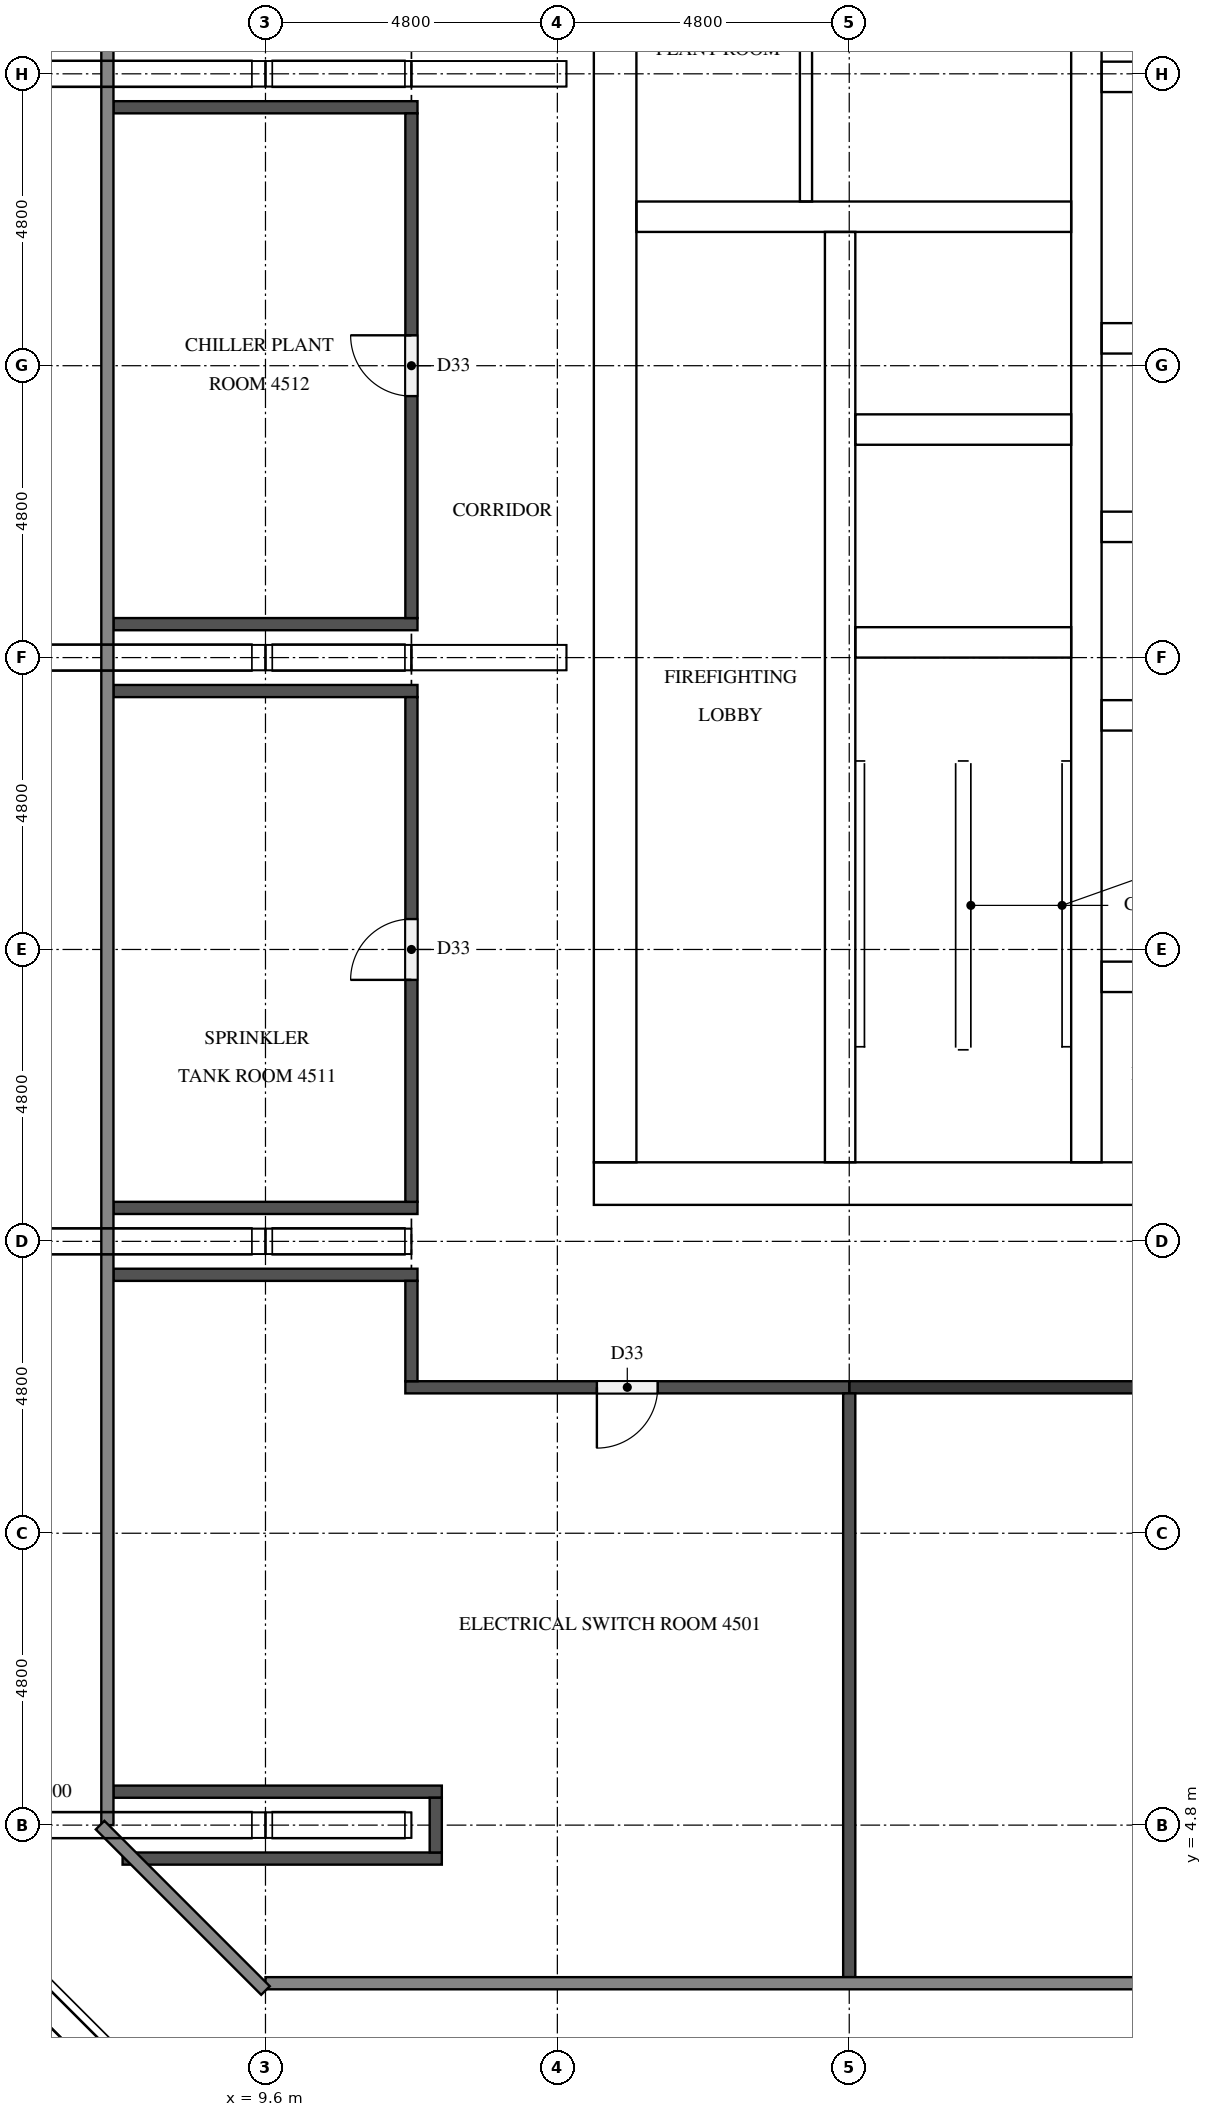
"""IFC4 building model, lengths in metres.
Left out: names, types, materials, properties, quantities, classifications, styles, units other than length and angle.
Written with IfcOpenShell. Run it as: python <this file> out.ifc"""

import sys

from ifc_helpers import new_model, si_unit, direction, frame, frame_2d, origin, place, context, subcontext, project, spatial, rectangle, extrude, element, fill, save


model = new_model("IFC4")
c1 = context("Model", 3, precision=1e-05, world=origin(), true_north=direction((0.0, 1.0)))
c2 = subcontext(c1, "Body", "Model", "MODEL_VIEW")
j1 = project(units=[si_unit("LENGTHUNIT", "METRE"), si_unit("PLANEANGLEUNIT", "RADIAN")], contexts=[c1])
p1 = place(None, origin())
s1 = spatial("IfcSite", under=j1, at=p1, CompositionType="ELEMENT")
p2 = place(p1, origin())
s2 = spatial("IfcBuilding", under=s1, at=p2, CompositionType="ELEMENT")
p3 = place(p2, frame((0.0, 0.0, 173.5)))
s3 = spatial("IfcBuildingStorey", under=s2, at=p3, CompositionType="ELEMENT", Elevation=173.5)
p4 = place(p3, frame((15.0, 15.35, 0.0), z_axis=(0.0, 0.0, 1.0), x_axis=(1.0, 0.0, 0.0)))
e1 = element("IfcWall", 1, at=p4, inside=s3, PredefinedType="SHEAR", context=c2, shape_type="SweptSolid", body=[
    extrude(rectangle(XDim=32.4, YDim=0.7, at=frame_2d((16.2, 0.0))), origin(), (0.0, 0.0, 1.0), 5.1),
])
p5 = place(p4, frame((15.3, 0.0, 0.0)))
e2 = element("IfcOpeningElement", 2, at=p5, cuts=e1, PredefinedType="OPENING", context=c2, shape_type="SweptSolid", body=[
    extrude(rectangle(XDim=1.8, YDim=2.1, at=frame_2d((0.9, 1.05))), frame((0.0, 0.36, 0.0), z_axis=(0.0, -1.0, 0.0), x_axis=(1.0, 0.0, 0.0)), (0.0, 0.0, 1.0), 0.72),
])
p6 = place(p3, frame((15.35, 15.7, 0.0), z_axis=(0.0, 0.0, 1.0), x_axis=(0.0, 1.0, 0.0)))
e3 = element("IfcWall", 3, at=p6, inside=s3, PredefinedType="SHEAR", context=c2, shape_type="SweptSolid", body=[
    extrude(rectangle(XDim=21.4, YDim=0.7, at=frame_2d((10.7, 0.0))), origin(), (0.0, 0.0, 1.0), 5.1),
])
p7 = place(p6, frame((5.06, 0.0, 0.0)))
e4 = element("IfcOpeningElement", 4, at=p7, cuts=e3, PredefinedType="OPENING", context=c2, shape_type="SweptSolid", body=[
    extrude(rectangle(XDim=1.2, YDim=2.1, at=frame_2d((0.6, 1.05))), frame((0.0, 0.36, 0.0), z_axis=(0.0, -1.0, 0.0), x_axis=(1.0, 0.0, 0.0)), (0.0, 0.0, 1.0), 0.72),
])
p8 = place(p3, frame((19.05, 15.7, 0.0), z_axis=(0.0, 0.0, 1.0), x_axis=(0.0, 1.0, 0.0)))
e5 = element("IfcWall", 5, at=p8, inside=s3, PredefinedType="SHEAR", context=c2, shape_type="SweptSolid", body=[
    extrude(rectangle(XDim=15.3, YDim=0.5, at=frame_2d((7.65, 0.0))), origin(), (0.0, 0.0, 1.0), 5.1),
])
p9 = place(p8, frame((9.75, 0.0, 0.0)))
e6 = element("IfcOpeningElement", 6, at=p9, cuts=e5, PredefinedType="OPENING", context=c2, shape_type="SweptSolid", body=[
    extrude(rectangle(XDim=1.1, YDim=2.1, at=frame_2d((0.55, 1.05))), frame((0.0, 0.26, 0.0), z_axis=(0.0, -1.0, 0.0), x_axis=(1.0, 0.0, 0.0)), (0.0, 0.0, 1.0), 0.52),
])
p10 = place(p8, frame((13.25, 0.0, 0.0)))
e7 = element("IfcOpeningElement", 7, at=p10, cuts=e5, PredefinedType="OPENING", context=c2, shape_type="SweptSolid", body=[
    extrude(rectangle(XDim=1.1, YDim=2.1, at=frame_2d((0.55, 1.05))), frame((0.0, 0.26, 0.0), z_axis=(0.0, -1.0, 0.0), x_axis=(1.0, 0.0, 0.0)), (0.0, 0.0, 1.0), 0.52),
])
p11 = place(p8, frame((0.5, 0.0, 0.0)))
e8 = element("IfcOpeningElement", 8, at=p11, cuts=e5, PredefinedType="OPENING", context=c2, shape_type="SweptSolid", body=[
    extrude(rectangle(XDim=1.2, YDim=2.1, at=frame_2d((0.6, 1.05))), frame((0.0, 0.26, 0.0), z_axis=(0.0, -1.0, 0.0), x_axis=(1.0, 0.0, 0.0)), (0.0, 0.0, 1.0), 0.52),
])
p12 = place(p3, frame((23.1, 15.7, 0.0), z_axis=(0.0, 0.0, 1.0), x_axis=(0.0, 1.0, 0.0)))
e9 = element("IfcWall", 9, at=p12, inside=s3, PredefinedType="SHEAR", context=c2, shape_type="SweptSolid", body=[
    extrude(rectangle(XDim=21.4, YDim=0.5, at=frame_2d((10.7, 0.0))), origin(), (0.0, 0.0, 1.0), 5.1),
])
for number, where, z_axis, x_axis in (
    (10, (19.3, 24.25, 0.0), (0.0, 0.0, 1.0), (1.0, 0.0, 0.0)),
    (11, (19.3, 27.75, 0.0), (0.0, 0.0, 1.0), (1.0, 0.0, 0.0)),
):
    element("IfcWall", number, at=place(p3, frame(where, z_axis=z_axis, x_axis=x_axis)), inside=s3, PredefinedType="SHEAR", context=c2, shape_type="SweptSolid", body=[
        extrude(rectangle(XDim=3.55, YDim=0.5, at=frame_2d((1.775, 0.0))), origin(), (0.0, 0.0, 1.0), 5.1),
    ])
p13 = place(p3, frame((15.7, 31.25, 0.0), z_axis=(0.0, 0.0, 1.0), x_axis=(1.0, 0.0, 0.0)))
e12 = element("IfcWall", 12, at=p13, inside=s3, PredefinedType="SHEAR", context=c2, shape_type="SweptSolid", body=[
    extrude(rectangle(XDim=7.15, YDim=0.5, at=frame_2d((3.575, 0.0))), origin(), (0.0, 0.0, 1.0), 5.1),
])
p14 = place(p3, frame((23.35, 18.75, 0.0), z_axis=(0.0, 0.0, 1.0), x_axis=(1.0, 0.0, 0.0)))
e13 = element("IfcWall", 13, at=p14, inside=s3, PredefinedType="SHEAR", context=c2, shape_type="SweptSolid", body=[
    extrude(rectangle(XDim=5.6, YDim=0.5, at=frame_2d((2.8, 0.0))), origin(), (0.0, 0.0, 1.0), 5.1),
])
p15 = place(p14, frame((2.05, 0.0, 0.0)))
e14 = element("IfcOpeningElement", 14, at=p15, cuts=e13, PredefinedType="OPENING", context=c2, shape_type="SweptSolid", body=[
    extrude(rectangle(XDim=1.0, YDim=2.1, at=frame_2d((0.5, 1.05))), frame((0.0, 0.26, 0.0), z_axis=(0.0, -1.0, 0.0), x_axis=(1.0, 0.0, 0.0)), (0.0, 0.0, 1.0), 0.52),
])
p16 = place(p3, frame((23.35, 23.05, 0.0), z_axis=(0.0, 0.0, 1.0), x_axis=(1.0, 0.0, 0.0)))
e15 = element("IfcWall", 15, at=p16, inside=s3, PredefinedType="SHEAR", context=c2, shape_type="SweptSolid", body=[
    extrude(rectangle(XDim=15.7, YDim=0.5, at=frame_2d((7.85, 0.0))), origin(), (0.0, 0.0, 1.0), 5.1),
])
p17 = place(p16, frame((2.05, 0.0, 0.0)))
e16 = element("IfcOpeningElement", 16, at=p17, cuts=e15, PredefinedType="OPENING", context=c2, shape_type="SweptSolid", body=[
    extrude(rectangle(XDim=1.0, YDim=2.1, at=frame_2d((0.5, 1.05))), frame((0.0, 0.26, 0.0), z_axis=(0.0, -1.0, 0.0), x_axis=(1.0, 0.0, 0.0)), (0.0, 0.0, 1.0), 0.52),
])
p18 = place(p16, frame((12.65, 0.0, 0.0)))
e17 = element("IfcOpeningElement", 17, at=p18, cuts=e15, PredefinedType="OPENING", context=c2, shape_type="SweptSolid", body=[
    extrude(rectangle(XDim=1.0, YDim=2.1, at=frame_2d((0.5, 1.05))), frame((0.0, 0.26, 0.0), z_axis=(0.0, -1.0, 0.0), x_axis=(1.0, 0.0, 0.0)), (0.0, 0.0, 1.0), 0.52),
])
p19 = place(p3, frame((23.35, 26.15, 0.0), z_axis=(0.0, 0.0, 1.0), x_axis=(1.0, 0.0, 0.0)))
e18 = element("IfcWall", 18, at=p19, inside=s3, PredefinedType="SHEAR", context=c2, shape_type="SweptSolid", body=[
    extrude(rectangle(XDim=15.7, YDim=0.5, at=frame_2d((7.85, 0.0))), origin(), (0.0, 0.0, 1.0), 5.1),
])
p20 = place(p3, frame((23.35, 29.25, 0.0), z_axis=(0.0, 0.0, 1.0), x_axis=(1.0, 0.0, 0.0)))
e19 = element("IfcWall", 19, at=p20, inside=s3, PredefinedType="SHEAR", context=c2, shape_type="SweptSolid", body=[
    extrude(rectangle(XDim=15.7, YDim=0.5, at=frame_2d((7.85, 0.0))), origin(), (0.0, 0.0, 1.0), 5.1),
])
p21 = place(p20, frame((0.675, 0.0, 0.0)))
e20 = element("IfcOpeningElement", 20, at=p21, cuts=e19, PredefinedType="OPENING", context=c2, shape_type="SweptSolid", body=[
    extrude(rectangle(XDim=1.1, YDim=2.1, at=frame_2d((0.55, 1.05))), frame((0.0, 0.26, 0.0), z_axis=(0.0, -1.0, 0.0), x_axis=(1.0, 0.0, 0.0)), (0.0, 0.0, 1.0), 0.52),
])
p22 = place(p20, frame((3.325, 0.0, 0.0)))
e21 = element("IfcOpeningElement", 21, at=p22, cuts=e19, PredefinedType="OPENING", context=c2, shape_type="SweptSolid", body=[
    extrude(rectangle(XDim=1.1, YDim=2.1, at=frame_2d((0.55, 1.05))), frame((0.0, 0.26, 0.0), z_axis=(0.0, -1.0, 0.0), x_axis=(1.0, 0.0, 0.0)), (0.0, 0.0, 1.0), 0.52),
])
p23 = place(p20, frame((5.975, 0.0, 0.0)))
e22 = element("IfcOpeningElement", 22, at=p23, cuts=e19, PredefinedType="OPENING", context=c2, shape_type="SweptSolid", body=[
    extrude(rectangle(XDim=1.1, YDim=2.1, at=frame_2d((0.55, 1.05))), frame((0.0, 0.26, 0.0), z_axis=(0.0, -1.0, 0.0), x_axis=(1.0, 0.0, 0.0)), (0.0, 0.0, 1.0), 0.52),
])
p24 = place(p20, frame((8.625, 0.0, 0.0)))
e23 = element("IfcOpeningElement", 23, at=p24, cuts=e19, PredefinedType="OPENING", context=c2, shape_type="SweptSolid", body=[
    extrude(rectangle(XDim=1.1, YDim=2.1, at=frame_2d((0.55, 1.05))), frame((0.0, 0.26, 0.0), z_axis=(0.0, -1.0, 0.0), x_axis=(1.0, 0.0, 0.0)), (0.0, 0.0, 1.0), 0.52),
])
p25 = place(p20, frame((11.275, 0.0, 0.0)))
e24 = element("IfcOpeningElement", 24, at=p25, cuts=e19, PredefinedType="OPENING", context=c2, shape_type="SweptSolid", body=[
    extrude(rectangle(XDim=1.1, YDim=2.1, at=frame_2d((0.55, 1.05))), frame((0.0, 0.26, 0.0), z_axis=(0.0, -1.0, 0.0), x_axis=(1.0, 0.0, 0.0)), (0.0, 0.0, 1.0), 0.52),
])
p26 = place(p20, frame((13.925, 0.0, 0.0)))
e25 = element("IfcOpeningElement", 25, at=p26, cuts=e19, PredefinedType="OPENING", context=c2, shape_type="SweptSolid", body=[
    extrude(rectangle(XDim=1.1, YDim=2.1, at=frame_2d((0.55, 1.05))), frame((0.0, 0.26, 0.0), z_axis=(0.0, -1.0, 0.0), x_axis=(1.0, 0.0, 0.0)), (0.0, 0.0, 1.0), 0.52),
])
p27 = place(p3, frame((23.35, 33.55, 0.0), z_axis=(0.0, 0.0, 1.0), x_axis=(1.0, 0.0, 0.0)))
e26 = element("IfcWall", 26, at=p27, inside=s3, PredefinedType="SHEAR", context=c2, shape_type="SweptSolid", body=[
    extrude(rectangle(XDim=5.6, YDim=0.5, at=frame_2d((2.8, 0.0))), origin(), (0.0, 0.0, 1.0), 5.1),
])
p28 = place(p27, frame((2.05, 0.0, 0.0)))
e27 = element("IfcOpeningElement", 27, at=p28, cuts=e26, PredefinedType="OPENING", context=c2, shape_type="SweptSolid", body=[
    extrude(rectangle(XDim=1.0, YDim=2.1, at=frame_2d((0.5, 1.05))), frame((0.0, 0.26, 0.0), z_axis=(0.0, -1.0, 0.0), x_axis=(1.0, 0.0, 0.0)), (0.0, 0.0, 1.0), 0.52),
])
p29 = place(p3, frame((18.489, 31.5, 0.0), z_axis=(0.0, 0.0, 1.0), x_axis=(0.0, 1.0, 0.0)))
e28 = element("IfcWall", 28, at=p29, inside=s3, PredefinedType="PARTITIONING", context=c2, shape_type="SweptSolid", body=[
    extrude(rectangle(XDim=5.6, YDim=0.2, at=frame_2d((2.8, 0.0))), origin(), (0.0, 0.0, 1.0), 5.1),
])
p30 = place(p3, frame((7.25, 4.25, 0.0), z_axis=(0.0, 0.0, 1.0), x_axis=(1.0, 0.0, 0.0)))
e29 = element("IfcWall", 29, at=p30, inside=s3, PredefinedType="PARTITIONING", context=c2, shape_type="SweptSolid", body=[
    extrude(rectangle(XDim=5.25, YDim=0.2, at=frame_2d((2.625, 0.0))), origin(), (0.0, 0.0, 1.0), 5.1),
])
p31 = place(p3, frame((7.1, 5.35, 0.0), z_axis=(0.0, 0.0, 1.0), x_axis=(1.0, 0.0, 0.0)))
e30 = element("IfcWall", 30, at=p31, inside=s3, PredefinedType="PARTITIONING", context=c2, shape_type="SweptSolid", body=[
    extrude(rectangle(XDim=5.4, YDim=0.2, at=frame_2d((2.7, 0.0))), origin(), (0.0, 0.0, 1.0), 5.1),
])
p32 = place(p3, frame((19.2, 12.0, 0.0), z_axis=(0.0, 0.0, 1.0), x_axis=(1.0, 0.0, 0.0)))
e31 = element("IfcWall", 31, at=p32, inside=s3, PredefinedType="PARTITIONING", context=c2, shape_type="SweptSolid", body=[
    extrude(rectangle(XDim=31.3, YDim=0.2, at=frame_2d((15.65, 0.0))), origin(), (0.0, 0.0, 1.0), 5.1),
])
p33 = place(p32, frame((22.95, 0.0, 0.0)))
e32 = element("IfcOpeningElement", 32, at=p33, cuts=e31, PredefinedType="OPENING", context=c2, shape_type="SweptSolid", body=[
    extrude(rectangle(XDim=1.0, YDim=2.1, at=frame_2d((0.5, 1.05))), frame((0.0, 0.11, 0.0), z_axis=(0.0, -1.0, 0.0), x_axis=(1.0, 0.0, 0.0)), (0.0, 0.0, 1.0), 0.22),
])
p34 = place(p32, frame((7.35, 0.0, 0.0)))
e33 = element("IfcOpeningElement", 33, at=p34, cuts=e31, PredefinedType="OPENING", context=c2, shape_type="SweptSolid", body=[
    extrude(rectangle(XDim=1.0, YDim=2.1, at=frame_2d((0.5, 1.05))), frame((0.0, 0.11, 0.0), z_axis=(0.0, -1.0, 0.0), x_axis=(1.0, 0.0, 0.0)), (0.0, 0.0, 1.0), 0.22),
])
p35 = place(p3, frame((19.2, 12.0, 0.0), z_axis=(0.0, 0.0, 1.0), x_axis=(-1.0, 0.0, 0.0)))
e34 = element("IfcWall", 34, at=p35, inside=s3, PredefinedType="PARTITIONING", context=c2, shape_type="SweptSolid", body=[
    extrude(rectangle(XDim=7.3, YDim=0.2, at=frame_2d((3.65, 0.0))), origin(), (0.0, 0.0, 1.0), 5.1),
])
p36 = place(p35, frame((3.15, 0.0, 0.0)))
e35 = element("IfcOpeningElement", 35, at=p36, cuts=e34, PredefinedType="OPENING", context=c2, shape_type="SweptSolid", body=[
    extrude(rectangle(XDim=1.0, YDim=2.1, at=frame_2d((0.5, 1.05))), frame((0.0, 0.11, 0.0), z_axis=(0.0, -1.0, 0.0), x_axis=(1.0, 0.0, 0.0)), (0.0, 0.0, 1.0), 0.22),
])
for number, where, z_axis, x_axis in (
    (36, (7.1, 13.85, 0.0), (0.0, 0.0, 1.0), (1.0, 0.0, 0.0)),
    (37, (7.1, 14.95, 0.0), (0.0, 0.0, 1.0), (1.0, 0.0, 0.0)),
    (38, (7.1, 23.45, 0.0), (0.0, 0.0, 1.0), (1.0, 0.0, 0.0)),
    (39, (7.1, 24.55, 0.0), (0.0, 0.0, 1.0), (1.0, 0.0, 0.0)),
    (40, (7.1, 33.05, 0.0), (0.0, 0.0, 1.0), (1.0, 0.0, 0.0)),
):
    element("IfcWall", number, at=place(p3, frame(where, z_axis=z_axis, x_axis=x_axis)), inside=s3, PredefinedType="PARTITIONING", context=c2, shape_type="SweptSolid", body=[
        extrude(rectangle(XDim=5.0, YDim=0.2, at=frame_2d((2.5, 0.0))), origin(), (0.0, 0.0, 1.0), 5.1),
    ])
p37 = place(p3, frame((12.0, 12.1, 0.0), z_axis=(0.0, 0.0, 1.0), x_axis=(0.0, 1.0, 0.0)))
e41 = element("IfcWall", 41, at=p37, inside=s3, PredefinedType="PARTITIONING", context=c2, shape_type="SweptSolid", body=[
    extrude(rectangle(XDim=1.65, YDim=0.2, at=frame_2d((0.825, 0.0))), origin(), (0.0, 0.0, 1.0), 5.1),
])
p38 = place(p3, frame((12.0, 15.05, 0.0), z_axis=(0.0, 0.0, 1.0), x_axis=(0.0, 1.0, 0.0)))
e42 = element("IfcWall", 42, at=p38, inside=s3, PredefinedType="PARTITIONING", context=c2, shape_type="SweptSolid", body=[
    extrude(rectangle(XDim=8.3, YDim=0.2, at=frame_2d((4.15, 0.0))), origin(), (0.0, 0.0, 1.0), 5.1),
])
p39 = place(p38, frame((3.65, 0.0, 0.0)))
e43 = element("IfcOpeningElement", 43, at=p39, cuts=e42, PredefinedType="OPENING", context=c2, shape_type="SweptSolid", body=[
    extrude(rectangle(XDim=1.0, YDim=2.1, at=frame_2d((0.5, 1.05))), frame((0.0, 0.11, 0.0), z_axis=(0.0, -1.0, 0.0), x_axis=(1.0, 0.0, 0.0)), (0.0, 0.0, 1.0), 0.22),
])
p40 = place(p3, frame((12.0, 24.65, 0.0), z_axis=(0.0, 0.0, 1.0), x_axis=(0.0, 1.0, 0.0)))
e44 = element("IfcWall", 44, at=p40, inside=s3, PredefinedType="PARTITIONING", context=c2, shape_type="SweptSolid", body=[
    extrude(rectangle(XDim=8.3, YDim=0.2, at=frame_2d((4.15, 0.0))), origin(), (0.0, 0.0, 1.0), 5.1),
])
p41 = place(p40, frame((3.65, 0.0, 0.0)))
e45 = element("IfcOpeningElement", 45, at=p41, cuts=e44, PredefinedType="OPENING", context=c2, shape_type="SweptSolid", body=[
    extrude(rectangle(XDim=1.0, YDim=2.1, at=frame_2d((0.5, 1.05))), frame((0.0, 0.11, 0.0), z_axis=(0.0, -1.0, 0.0), x_axis=(1.0, 0.0, 0.0)), (0.0, 0.0, 1.0), 0.22),
])
p42 = place(p3, frame((12.4, 4.35, 0.0), z_axis=(0.0, 0.0, 1.0), x_axis=(0.0, 1.0, 0.0)))
e46 = element("IfcWall", 46, at=p42, inside=s3, PredefinedType="PARTITIONING", context=c2, shape_type="SweptSolid", body=[
    extrude(rectangle(XDim=0.9, YDim=0.2, at=frame_2d((0.45, 0.0))), origin(), (0.0, 0.0, 1.0), 5.1),
])
p43 = place(p3, frame((19.2, 2.3, 0.0), z_axis=(0.0, 0.0, 1.0), x_axis=(0.0, 1.0, 0.0)))
e47 = element("IfcWall", 47, at=p43, inside=s3, PredefinedType="PARTITIONING", context=c2, shape_type="SweptSolid", body=[
    extrude(rectangle(XDim=9.6, YDim=0.2, at=frame_2d((4.8, 0.0))), origin(), (0.0, 0.0, 1.0), 5.1),
])
p44 = place(p9, origin())
e48 = element("IfcDoor", 48, at=p44, inside=s3, OperationType="DOUBLE_DOOR_SLIDING", PredefinedType="DOOR", context=c2, shape_type="SweptSolid", body=[
    extrude(rectangle(XDim=1.1, YDim=2.1, at=frame_2d((0.55, 1.05))), frame((0.0, 0.025, 0.0), z_axis=(0.0, -1.0, 0.0), x_axis=(1.0, 0.0, 0.0)), (0.0, 0.0, 1.0), 0.05),
])
fill(e6, e48)
p45 = place(p10, origin())
e49 = element("IfcDoor", 49, at=p45, inside=s3, OperationType="DOUBLE_DOOR_SLIDING", PredefinedType="DOOR", context=c2, shape_type="SweptSolid", body=[
    extrude(rectangle(XDim=1.1, YDim=2.1, at=frame_2d((0.55, 1.05))), frame((0.0, 0.025, 0.0), z_axis=(0.0, -1.0, 0.0), x_axis=(1.0, 0.0, 0.0)), (0.0, 0.0, 1.0), 0.05),
])
fill(e7, e49)
p46 = place(p11, frame((1.2, 0.0, 0.0), z_axis=(0.0, 0.0, 1.0), x_axis=(-1.0, 0.0, 0.0)))
e50 = element("IfcDoor", 50, at=p46, inside=s3, OperationType="SINGLE_SWING_LEFT", PredefinedType="DOOR", context=c2, shape_type="SweptSolid", body=[
    extrude(rectangle(XDim=1.2, YDim=2.1, at=frame_2d((0.6, 1.05))), frame((0.0, 0.025, 0.0), z_axis=(0.0, -1.0, 0.0), x_axis=(1.0, 0.0, 0.0)), (0.0, 0.0, 1.0), 0.05),
])
fill(e8, e50)
p47 = place(p7, frame((1.2, 0.0, 0.0), z_axis=(0.0, 0.0, 1.0), x_axis=(-1.0, 0.0, 0.0)))
e51 = element("IfcDoor", 51, at=p47, inside=s3, OperationType="SINGLE_SWING_RIGHT", PredefinedType="DOOR", context=c2, shape_type="SweptSolid", body=[
    extrude(rectangle(XDim=1.2, YDim=2.1, at=frame_2d((0.6, 1.05))), frame((0.0, 0.025, 0.0), z_axis=(0.0, -1.0, 0.0), x_axis=(1.0, 0.0, 0.0)), (0.0, 0.0, 1.0), 0.05),
])
fill(e4, e51)
p48 = place(p36, origin())
e52 = element("IfcDoor", 52, at=p48, inside=s3, OperationType="SINGLE_SWING_RIGHT", PredefinedType="DOOR", context=c2, shape_type="SweptSolid", body=[
    extrude(rectangle(XDim=1.0, YDim=2.1, at=frame_2d((0.5, 1.05))), frame((0.0, 0.025, 0.0), z_axis=(0.0, -1.0, 0.0), x_axis=(1.0, 0.0, 0.0)), (0.0, 0.0, 1.0), 0.05),
])
fill(e35, e52)
p49 = place(p39, origin())
e53 = element("IfcDoor", 53, at=p49, inside=s3, OperationType="SINGLE_SWING_LEFT", PredefinedType="DOOR", context=c2, shape_type="SweptSolid", body=[
    extrude(rectangle(XDim=1.0, YDim=2.1, at=frame_2d((0.5, 1.05))), frame((0.0, 0.025, 0.0), z_axis=(0.0, -1.0, 0.0), x_axis=(1.0, 0.0, 0.0)), (0.0, 0.0, 1.0), 0.05),
])
fill(e43, e53)
p50 = place(p41, origin())
e54 = element("IfcDoor", 54, at=p50, inside=s3, OperationType="SINGLE_SWING_RIGHT", PredefinedType="DOOR", context=c2, shape_type="SweptSolid", body=[
    extrude(rectangle(XDim=1.0, YDim=2.1, at=frame_2d((0.5, 1.05))), frame((0.0, 0.025, 0.0), z_axis=(0.0, -1.0, 0.0), x_axis=(1.0, 0.0, 0.0)), (0.0, 0.0, 1.0), 0.05),
])
fill(e45, e54)
save(model, sys.argv[1])
